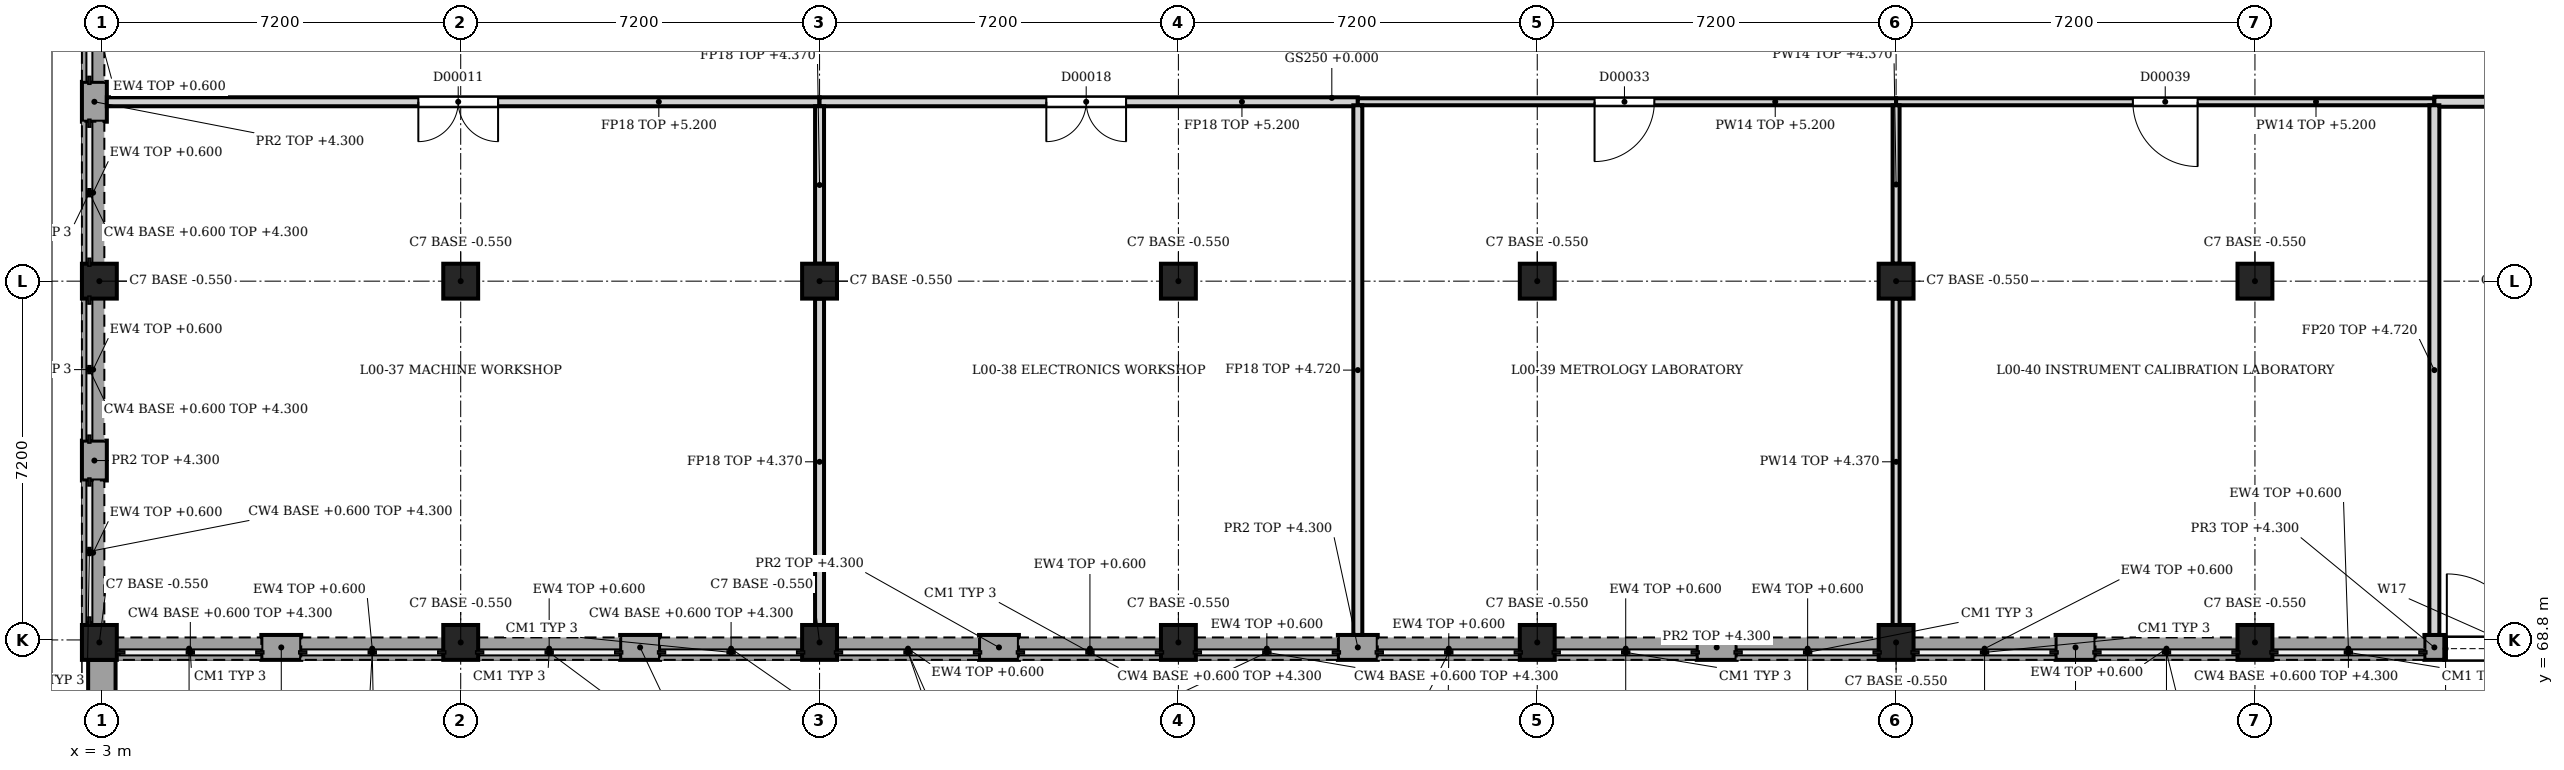
"""IFC4 building model, lengths in metres.
Left out: names, types, materials, properties, quantities, classifications, styles, units other than length and angle.
Written with IfcOpenShell. Run it as: python <this file> out.ifc"""

import sys

from ifc_helpers import new_model, si_unit, direction, frame, frame_2d, origin, origin_2d, place, context, subcontext, project, spatial, rectangle, extrude, element, fill, save


model = new_model("IFC4")
c1 = context("Model", 3, precision=1e-05, world=origin(), true_north=direction((0.0, 1.0)))
c2 = subcontext(c1, "Body", "Model", "MODEL_VIEW")
j1 = project(units=[si_unit("LENGTHUNIT", "METRE"), si_unit("PLANEANGLEUNIT", "RADIAN")], contexts=[c1])
p1 = place(None, origin())
s1 = spatial("IfcSite", under=j1, at=p1, CompositionType="ELEMENT")
p2 = place(p1, origin())
s2 = spatial("IfcBuilding", under=s1, at=p2, CompositionType="ELEMENT")
p3 = place(p2, origin())
s3 = spatial("IfcBuildingStorey", under=s2, at=p3, CompositionType="ELEMENT", Elevation=0.0)
for number, where, z_axis, x_axis in (
    (1, (2.95, 68.75, -0.55), (0.0, 0.0, 1.0), (1.0, 0.0, 0.0)),
    (2, (2.95, 76.0, -0.55), (0.0, 0.0, 1.0), (1.0, 0.0, 0.0)),
    (3, (10.2, 68.75, -0.55), (0.0, 0.0, 1.0), (1.0, 0.0, 0.0)),
    (4, (10.2, 76.0, -0.55), (0.0, 0.0, 1.0), (1.0, 0.0, 0.0)),
    (5, (17.4, 68.75, -0.55), (0.0, 0.0, 1.0), (1.0, 0.0, 0.0)),
    (6, (17.4, 76.0, -0.55), (0.0, 0.0, 1.0), (1.0, 0.0, 0.0)),
    (7, (24.6, 68.75, -0.55), (0.0, 0.0, 1.0), (1.0, 0.0, 0.0)),
    (8, (24.6, 76.0, -0.55), (0.0, 0.0, 1.0), (1.0, 0.0, 0.0)),
    (9, (31.8, 68.75, -0.55), (0.0, 0.0, 1.0), (1.0, 0.0, 0.0)),
    (10, (31.8, 76.0, -0.55), (0.0, 0.0, 1.0), (1.0, 0.0, 0.0)),
    (11, (39.0, 68.75, -0.55), (0.0, 0.0, 1.0), (1.0, 0.0, 0.0)),
    (12, (39.0, 76.0, -0.55), (0.0, 0.0, 1.0), (1.0, 0.0, 0.0)),
    (13, (46.2, 68.75, -0.55), (0.0, 0.0, 1.0), (1.0, 0.0, 0.0)),
    (14, (46.2, 76.0, -0.55), (0.0, 0.0, 1.0), (1.0, 0.0, 0.0)),
):
    element("IfcColumn", number, at=place(p3, frame(where, z_axis=z_axis, x_axis=x_axis)), inside=s3, PredefinedType="COLUMN", context=c2, shape_type="SweptSolid", body=[
        extrude(rectangle(XDim=0.7, YDim=0.7, at=origin_2d()), origin(), (0.0, 0.0, 1.0), 5.95),
    ])
for number, where, z_axis, x_axis in (
    (15, (2.85, 72.0, 0.0), (0.0, 0.0, 1.0), (0.0, 1.0, 0.0)),
    (16, (2.85, 79.2, 0.0), (0.0, 0.0, 1.0), (0.0, 1.0, 0.0)),
):
    element("IfcWall", number, at=place(p3, frame(where, z_axis=z_axis, x_axis=x_axis)), inside=s3, PredefinedType="SOLIDWALL", context=c2, shape_type="SweptSolid", body=[
        extrude(rectangle(XDim=0.8, YDim=0.5, at=frame_2d((0.4, 0.0))), origin(), (0.0, 0.0, 1.0), 4.3),
    ])
p4 = place(p3, frame((2.825, 69.1, 0.0), z_axis=(0.0, 0.0, 1.0), x_axis=(0.0, 1.0, 0.0)))
e17 = element("IfcWall", 17, at=p4, inside=s3, PredefinedType="SOLIDWALL", context=c2, shape_type="SweptSolid", body=[
    extrude(rectangle(XDim=2.9, YDim=0.45, at=frame_2d((1.45, 0.0))), origin(), (0.0, 0.0, 1.0), 0.6),
])
for number, where, z_axis, x_axis in (
    (18, (2.825, 72.8, 0.0), (0.0, 0.0, 1.0), (0.0, 1.0, 0.0)),
    (19, (2.825, 76.35, 0.0), (0.0, 0.0, 1.0), (0.0, 1.0, 0.0)),
):
    element("IfcWall", number, at=place(p3, frame(where, z_axis=z_axis, x_axis=x_axis)), inside=s3, PredefinedType="SOLIDWALL", context=c2, shape_type="SweptSolid", body=[
        extrude(rectangle(XDim=2.85, YDim=0.45, at=frame_2d((1.425, 0.0))), origin(), (0.0, 0.0, 1.0), 0.6),
    ])
p5 = place(p3, frame((2.825, 80.0, 0.0), z_axis=(0.0, 0.0, 1.0), x_axis=(0.0, 1.0, 0.0)))
e20 = element("IfcWall", 20, at=p5, inside=s3, PredefinedType="SOLIDWALL", context=c2, shape_type="SweptSolid", body=[
    extrude(rectangle(XDim=2.85, YDim=0.45, at=frame_2d((1.425, 0.0))), origin(), (0.0, 0.0, 1.0), 0.6),
])
p6 = place(p3, frame((50.0, 68.65, 0.0), z_axis=(0.0, 0.0, 1.0), x_axis=(-1.0, 0.0, 0.0)))
e21 = element("IfcWall", 21, at=p6, inside=s3, PredefinedType="SOLIDWALL", context=c2, shape_type="SweptSolid", body=[
    extrude(rectangle(XDim=0.4, YDim=0.5, at=frame_2d((0.2, 0.0))), origin(), (0.0, 0.0, 1.0), 4.3),
])
for number, where, z_axis, x_axis in (
    (22, (43.0, 68.65, 0.0), (0.0, 0.0, 1.0), (-1.0, 0.0, 0.0)),
    (23, (35.8, 68.65, 0.0), (0.0, 0.0, 1.0), (-1.0, 0.0, 0.0)),
    (24, (28.6, 68.65, 0.0), (0.0, 0.0, 1.0), (-1.0, 0.0, 0.0)),
):
    element("IfcWall", number, at=place(p3, frame(where, z_axis=z_axis, x_axis=x_axis)), inside=s3, PredefinedType="SOLIDWALL", context=c2, shape_type="SweptSolid", body=[
        extrude(rectangle(XDim=0.8, YDim=0.5, at=frame_2d((0.4, 0.0))), origin(), (0.0, 0.0, 1.0), 4.3),
    ])
p7 = place(p3, frame((21.4, 68.65, 0.0), z_axis=(0.0, 0.0, 1.0), x_axis=(-1.0, 0.0, 0.0)))
e25 = element("IfcWall", 25, at=p7, inside=s3, PredefinedType="SOLIDWALL", context=c2, shape_type="SweptSolid", body=[
    extrude(rectangle(XDim=0.8, YDim=0.5, at=frame_2d((0.4, 0.0))), origin(), (0.0, 0.0, 1.0), 4.3),
])
for number, where, z_axis, x_axis in (
    (26, (14.2, 68.65, 0.0), (0.0, 0.0, 1.0), (-1.0, 0.0, 0.0)),
    (27, (7.0, 68.65, 0.0), (0.0, 0.0, 1.0), (-1.0, 0.0, 0.0)),
):
    element("IfcWall", number, at=place(p3, frame(where, z_axis=z_axis, x_axis=x_axis)), inside=s3, PredefinedType="SOLIDWALL", context=c2, shape_type="SweptSolid", body=[
        extrude(rectangle(XDim=0.8, YDim=0.5, at=frame_2d((0.4, 0.0))), origin(), (0.0, 0.0, 1.0), 4.3),
    ])
p8 = place(p3, frame((53.05, 68.625, 0.0), z_axis=(0.0, 0.0, 1.0), x_axis=(-1.0, 0.0, 0.0)))
e28 = element("IfcWall", 28, at=p8, inside=s3, PredefinedType="SOLIDWALL", context=c2, shape_type="SweptSolid", body=[
    extrude(rectangle(XDim=3.05, YDim=0.45, at=frame_2d((1.525, 0.0))), origin(), (0.0, 0.0, 1.0), 4.3),
])
p9 = place(p8, origin())
e29 = element("IfcOpeningElement", 29, at=p9, cuts=e28, PredefinedType="OPENING", context=c2, shape_type="SweptSolid", body=[
    extrude(rectangle(XDim=3.0, YDim=3.2, at=frame_2d((1.5, 1.6))), frame((0.0, 0.235, 0.0), z_axis=(0.0, -1.0, 0.0), x_axis=(1.0, 0.0, 0.0)), (0.0, 0.0, 1.0), 0.47),
])
p10 = place(p8, frame((0.0, 0.0, 3.3)))
e30 = element("IfcOpeningElement", 30, at=p10, cuts=e28, PredefinedType="OPENING", context=c2, shape_type="SweptSolid", body=[
    extrude(rectangle(XDim=3.0, YDim=0.4, at=frame_2d((1.5, 0.2))), frame((0.0, 0.235, 0.0), z_axis=(0.0, -1.0, 0.0), x_axis=(1.0, 0.0, 0.0)), (0.0, 0.0, 1.0), 0.47),
])
p11 = place(p3, frame((49.6, 68.625, 0.0), z_axis=(0.0, 0.0, 1.0), x_axis=(-1.0, 0.0, 0.0)))
e31 = element("IfcWall", 31, at=p11, inside=s3, PredefinedType="SOLIDWALL", context=c2, shape_type="SweptSolid", body=[
    extrude(rectangle(XDim=3.05, YDim=0.45, at=frame_2d((1.525, 0.0))), origin(), (0.0, 0.0, 1.0), 0.6),
])
p12 = place(p3, frame((45.85, 68.625, 0.0), z_axis=(0.0, 0.0, 1.0), x_axis=(-1.0, 0.0, 0.0)))
e32 = element("IfcWall", 32, at=p12, inside=s3, PredefinedType="SOLIDWALL", context=c2, shape_type="SweptSolid", body=[
    extrude(rectangle(XDim=2.85, YDim=0.45, at=frame_2d((1.425, 0.0))), origin(), (0.0, 0.0, 1.0), 0.6),
])
for number, where, z_axis, x_axis in (
    (33, (42.2, 68.625, 0.0), (0.0, 0.0, 1.0), (-1.0, 0.0, 0.0)),
    (34, (38.65, 68.625, 0.0), (0.0, 0.0, 1.0), (-1.0, 0.0, 0.0)),
):
    element("IfcWall", number, at=place(p3, frame(where, z_axis=z_axis, x_axis=x_axis)), inside=s3, PredefinedType="SOLIDWALL", context=c2, shape_type="SweptSolid", body=[
        extrude(rectangle(XDim=2.85, YDim=0.45, at=frame_2d((1.425, 0.0))), origin(), (0.0, 0.0, 1.0), 0.6),
    ])
p13 = place(p3, frame((35.0, 68.625, 0.0), z_axis=(0.0, 0.0, 1.0), x_axis=(-1.0, 0.0, 0.0)))
e35 = element("IfcWall", 35, at=p13, inside=s3, PredefinedType="SOLIDWALL", context=c2, shape_type="SweptSolid", body=[
    extrude(rectangle(XDim=2.85, YDim=0.45, at=frame_2d((1.425, 0.0))), origin(), (0.0, 0.0, 1.0), 0.6),
])
p14 = place(p3, frame((31.45, 68.625, 0.0), z_axis=(0.0, 0.0, 1.0), x_axis=(-1.0, 0.0, 0.0)))
e36 = element("IfcWall", 36, at=p14, inside=s3, PredefinedType="SOLIDWALL", context=c2, shape_type="SweptSolid", body=[
    extrude(rectangle(XDim=2.85, YDim=0.45, at=frame_2d((1.425, 0.0))), origin(), (0.0, 0.0, 1.0), 0.6),
])
for number, where, z_axis, x_axis in (
    (37, (27.8, 68.625, 0.0), (0.0, 0.0, 1.0), (-1.0, 0.0, 0.0)),
    (38, (24.25, 68.625, 0.0), (0.0, 0.0, 1.0), (-1.0, 0.0, 0.0)),
    (39, (20.6, 68.625, 0.0), (0.0, 0.0, 1.0), (-1.0, 0.0, 0.0)),
    (40, (17.05, 68.625, 0.0), (0.0, 0.0, 1.0), (-1.0, 0.0, 0.0)),
):
    element("IfcWall", number, at=place(p3, frame(where, z_axis=z_axis, x_axis=x_axis)), inside=s3, PredefinedType="SOLIDWALL", context=c2, shape_type="SweptSolid", body=[
        extrude(rectangle(XDim=2.85, YDim=0.45, at=frame_2d((1.425, 0.0))), origin(), (0.0, 0.0, 1.0), 0.6),
    ])
p15 = place(p3, frame((13.4, 68.625, 0.0), z_axis=(0.0, 0.0, 1.0), x_axis=(-1.0, 0.0, 0.0)))
e41 = element("IfcWall", 41, at=p15, inside=s3, PredefinedType="SOLIDWALL", context=c2, shape_type="SweptSolid", body=[
    extrude(rectangle(XDim=2.85, YDim=0.45, at=frame_2d((1.425, 0.0))), origin(), (0.0, 0.0, 1.0), 0.6),
])
p16 = place(p3, frame((9.85, 68.625, 0.0), z_axis=(0.0, 0.0, 1.0), x_axis=(-1.0, 0.0, 0.0)))
e42 = element("IfcWall", 42, at=p16, inside=s3, PredefinedType="SOLIDWALL", context=c2, shape_type="SweptSolid", body=[
    extrude(rectangle(XDim=2.85, YDim=0.45, at=frame_2d((1.425, 0.0))), origin(), (0.0, 0.0, 1.0), 0.6),
])
p17 = place(p3, frame((6.2, 68.625, 0.0), z_axis=(0.0, 0.0, 1.0), x_axis=(-1.0, 0.0, 0.0)))
e43 = element("IfcWall", 43, at=p17, inside=s3, PredefinedType="SOLIDWALL", context=c2, shape_type="SweptSolid", body=[
    extrude(rectangle(XDim=2.9, YDim=0.45, at=frame_2d((1.45, 0.0))), origin(), (0.0, 0.0, 1.0), 0.6),
])
p18 = place(p3, frame((3.0, 40.4, 0.0), z_axis=(0.0, 0.0, 1.0), x_axis=(0.0, 1.0, 0.0)))
e44 = element("IfcWall", 44, at=p18, inside=s3, PredefinedType="SOLIDWALL", context=c2, shape_type="SweptSolid", body=[
    extrude(rectangle(XDim=28.0, YDim=0.55, at=frame_2d((14.0, 0.0))), origin(), (0.0, 0.0, 1.0), 3.6),
])
p19 = place(p3, frame((17.4, 79.6, 0.0), z_axis=(0.0, 0.0, 1.0), x_axis=(-1.0, 0.0, 0.0)))
e45 = element("IfcWall", 45, at=p19, inside=s3, PredefinedType="PARTITIONING", context=c2, shape_type="SweptSolid", body=[
    extrude(rectangle(XDim=14.3, YDim=0.18, at=frame_2d((7.15, 0.0))), origin(), (0.0, 0.0, 1.0), 5.2),
])
p20 = place(p19, frame((6.45, 0.0, 0.0)))
e46 = element("IfcOpeningElement", 46, at=p20, cuts=e45, PredefinedType="OPENING", context=c2, shape_type="SweptSolid", body=[
    extrude(rectangle(XDim=1.6, YDim=2.2, at=frame_2d((0.8, 1.1))), frame((0.0, 0.1, 0.0), z_axis=(0.0, -1.0, 0.0), x_axis=(1.0, 0.0, 0.0)), (0.0, 0.0, 1.0), 0.2),
])
p21 = place(p3, frame((28.2, 79.6, 0.0), z_axis=(0.0, 0.0, 1.0), x_axis=(-1.0, 0.0, 0.0)))
e47 = element("IfcWall", 47, at=p21, inside=s3, PredefinedType="PARTITIONING", context=c2, shape_type="SweptSolid", body=[
    extrude(rectangle(XDim=10.8, YDim=0.18, at=frame_2d((5.4, 0.0))), origin(), (0.0, 0.0, 1.0), 5.2),
])
p22 = place(p21, frame((4.65, 0.0, 0.0)))
e48 = element("IfcOpeningElement", 48, at=p22, cuts=e47, PredefinedType="OPENING", context=c2, shape_type="SweptSolid", body=[
    extrude(rectangle(XDim=1.6, YDim=2.2, at=frame_2d((0.8, 1.1))), frame((0.0, 0.1, 0.0), z_axis=(0.0, -1.0, 0.0), x_axis=(1.0, 0.0, 0.0)), (0.0, 0.0, 1.0), 0.2),
])
p23 = place(p3, frame((39.0, 79.6, 0.0), z_axis=(0.0, 0.0, 1.0), x_axis=(-1.0, 0.0, 0.0)))
e49 = element("IfcWall", 49, at=p23, inside=s3, PredefinedType="PARTITIONING", context=c2, shape_type="SweptSolid", body=[
    extrude(rectangle(XDim=10.8, YDim=0.14, at=frame_2d((5.4, 0.0))), origin(), (0.0, 0.0, 1.0), 5.2),
])
p24 = place(p23, frame((4.85, 0.0, 0.0)))
e50 = element("IfcOpeningElement", 50, at=p24, cuts=e49, PredefinedType="OPENING", context=c2, shape_type="SweptSolid", body=[
    extrude(rectangle(XDim=1.2, YDim=2.1, at=frame_2d((0.6, 1.05))), frame((0.0, 0.08, 0.0), z_axis=(0.0, -1.0, 0.0), x_axis=(1.0, 0.0, 0.0)), (0.0, 0.0, 1.0), 0.16),
])
p25 = place(p3, frame((49.8, 79.6, 0.0), z_axis=(0.0, 0.0, 1.0), x_axis=(-1.0, 0.0, 0.0)))
e51 = element("IfcWall", 51, at=p25, inside=s3, PredefinedType="PARTITIONING", context=c2, shape_type="SweptSolid", body=[
    extrude(rectangle(XDim=10.8, YDim=0.14, at=frame_2d((5.4, 0.0))), origin(), (0.0, 0.0, 1.0), 5.2),
])
p26 = place(p25, frame((4.75, 0.0, 0.0)))
e52 = element("IfcOpeningElement", 52, at=p26, cuts=e51, PredefinedType="OPENING", context=c2, shape_type="SweptSolid", body=[
    extrude(rectangle(XDim=1.3, YDim=2.2, at=frame_2d((0.65, 1.1))), frame((0.0, 0.08, 0.0), z_axis=(0.0, -1.0, 0.0), x_axis=(1.0, 0.0, 0.0)), (0.0, 0.0, 1.0), 0.16),
])
p27 = place(p3, frame((57.0, 79.6, 0.0), z_axis=(0.0, 0.0, 1.0), x_axis=(-1.0, 0.0, 0.0)))
e53 = element("IfcWall", 53, at=p27, inside=s3, PredefinedType="PARTITIONING", context=c2, shape_type="SweptSolid", body=[
    extrude(rectangle(XDim=7.2, YDim=0.2, at=frame_2d((3.6, 0.0))), origin(), (0.0, 0.0, 1.0), 5.2),
])
p28 = place(p27, frame((3.05, 0.0, 0.0)))
e54 = element("IfcOpeningElement", 54, at=p28, cuts=e53, PredefinedType="OPENING", context=c2, shape_type="SweptSolid", body=[
    extrude(rectangle(XDim=1.2, YDim=2.3, at=frame_2d((0.6, 1.15))), frame((0.0, 0.11, 0.0), z_axis=(0.0, -1.0, 0.0), x_axis=(1.0, 0.0, 0.0)), (0.0, 0.0, 1.0), 0.22),
])
p29 = place(p3, frame((17.4, 69.1, 0.0), z_axis=(0.0, 0.0, 1.0), x_axis=(0.0, 1.0, 0.0)))
e55 = element("IfcWall", 55, at=p29, inside=s3, PredefinedType="PARTITIONING", context=c2, shape_type="SweptSolid", body=[
    extrude(rectangle(XDim=6.55, YDim=0.18, at=frame_2d((3.275, 0.0))), origin(), (0.0, 0.0, 1.0), 4.37),
])
p30 = place(p3, frame((17.4, 76.35, 0.0), z_axis=(0.0, 0.0, 1.0), x_axis=(0.0, 1.0, 0.0)))
e56 = element("IfcWall", 56, at=p30, inside=s3, PredefinedType="PARTITIONING", context=c2, shape_type="SweptSolid", body=[
    extrude(rectangle(XDim=3.16, YDim=0.18, at=frame_2d((1.58, 0.0))), origin(), (0.0, 0.0, 1.0), 4.37),
])
p31 = place(p3, frame((28.2, 68.9, 0.0), z_axis=(0.0, 0.0, 1.0), x_axis=(0.0, 1.0, 0.0)))
e57 = element("IfcWall", 57, at=p31, inside=s3, PredefinedType="PARTITIONING", context=c2, shape_type="SweptSolid", body=[
    extrude(rectangle(XDim=10.63, YDim=0.18, at=frame_2d((5.315, 0.0))), origin(), (0.0, 0.0, 1.0), 4.72),
])
p32 = place(p3, frame((39.0, 69.1, 0.0), z_axis=(0.0, 0.0, 1.0), x_axis=(0.0, 1.0, 0.0)))
e58 = element("IfcWall", 58, at=p32, inside=s3, PredefinedType="PARTITIONING", context=c2, shape_type="SweptSolid", body=[
    extrude(rectangle(XDim=6.55, YDim=0.14, at=frame_2d((3.275, 0.0))), origin(), (0.0, 0.0, 1.0), 4.37),
])
p33 = place(p3, frame((39.0, 76.35, 0.0), z_axis=(0.0, 0.0, 1.0), x_axis=(0.0, 1.0, 0.0)))
e59 = element("IfcWall", 59, at=p33, inside=s3, PredefinedType="PARTITIONING", context=c2, shape_type="SweptSolid", body=[
    extrude(rectangle(XDim=3.18, YDim=0.14, at=frame_2d((1.59, 0.0))), origin(), (0.0, 0.0, 1.0), 4.37),
])
p34 = place(p3, frame((49.8, 68.9, 0.0), z_axis=(0.0, 0.0, 1.0), x_axis=(0.0, 1.0, 0.0)))
e60 = element("IfcWall", 60, at=p34, inside=s3, PredefinedType="PARTITIONING", context=c2, shape_type="SweptSolid", body=[
    extrude(rectangle(XDim=10.63, YDim=0.2, at=frame_2d((5.315, 0.0))), origin(), (0.0, 0.0, 1.0), 4.72),
])
p35 = place(p9, origin())
e61 = element("IfcDoor", 61, at=p35, inside=s3, OperationType="SINGLE_SWING_LEFT", PredefinedType="DOOR", context=c2, shape_type="SweptSolid", body=[
    extrude(rectangle(XDim=3.0, YDim=3.2, at=frame_2d((1.5, 1.6))), frame((0.0, 0.025, 0.0), z_axis=(0.0, -1.0, 0.0), x_axis=(1.0, 0.0, 0.0)), (0.0, 0.0, 1.0), 0.05),
])
fill(e29, e61)
p36 = place(p10, origin())
e62 = element("IfcWindow", 62, at=p36, inside=s3, PartitioningType="SINGLE_PANEL", PredefinedType="WINDOW", context=c2, shape_type="SweptSolid", body=[
    extrude(rectangle(XDim=3.0, YDim=0.4, at=frame_2d((1.5, 0.2))), frame((0.0, 0.03, 0.0), z_axis=(0.0, -1.0, 0.0), x_axis=(1.0, 0.0, 0.0)), (0.0, 0.0, 1.0), 0.06),
])
fill(e30, e62)
p37 = place(p20, origin())
e63 = element("IfcDoor", 63, at=p37, inside=s3, OperationType="SINGLE_SWING_LEFT", PredefinedType="DOOR", context=c2, shape_type="SweptSolid", body=[
    extrude(rectangle(XDim=1.6, YDim=2.2, at=frame_2d((0.8, 1.1))), frame((0.0, 0.025, 0.0), z_axis=(0.0, -1.0, 0.0), x_axis=(1.0, 0.0, 0.0)), (0.0, 0.0, 1.0), 0.05),
])
fill(e46, e63)
p38 = place(p22, origin())
e64 = element("IfcDoor", 64, at=p38, inside=s3, OperationType="SINGLE_SWING_LEFT", PredefinedType="DOOR", context=c2, shape_type="SweptSolid", body=[
    extrude(rectangle(XDim=1.6, YDim=2.2, at=frame_2d((0.8, 1.1))), frame((0.0, 0.025, 0.0), z_axis=(0.0, -1.0, 0.0), x_axis=(1.0, 0.0, 0.0)), (0.0, 0.0, 1.0), 0.05),
])
fill(e48, e64)
p39 = place(p24, origin())
e65 = element("IfcDoor", 65, at=p39, inside=s3, OperationType="SINGLE_SWING_RIGHT", PredefinedType="DOOR", context=c2, shape_type="SweptSolid", body=[
    extrude(rectangle(XDim=1.2, YDim=2.1, at=frame_2d((0.6, 1.05))), frame((0.0, 0.025, 0.0), z_axis=(0.0, -1.0, 0.0), x_axis=(1.0, 0.0, 0.0)), (0.0, 0.0, 1.0), 0.05),
])
fill(e50, e65)
p40 = place(p26, origin())
e66 = element("IfcDoor", 66, at=p40, inside=s3, OperationType="SINGLE_SWING_LEFT", PredefinedType="DOOR", context=c2, shape_type="SweptSolid", body=[
    extrude(rectangle(XDim=1.3, YDim=2.2, at=frame_2d((0.65, 1.1))), frame((0.0, 0.025, 0.0), z_axis=(0.0, -1.0, 0.0), x_axis=(1.0, 0.0, 0.0)), (0.0, 0.0, 1.0), 0.05),
])
fill(e52, e66)
save(model, sys.argv[1])
